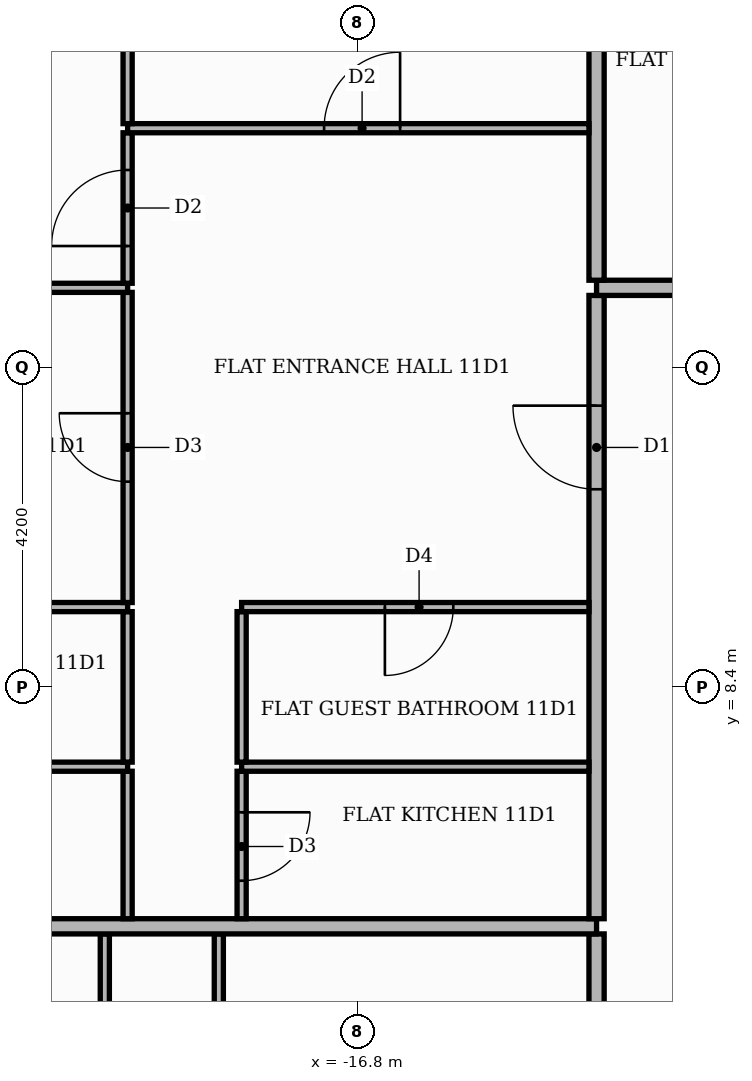
"""IFC4 building model, lengths in metres.
Left out: names, types, materials, properties, quantities, classifications, styles, units other than length and angle.
Written with IfcOpenShell. Run it as: python <this file> out.ifc"""

import sys

from ifc_helpers import new_model, si_unit, direction, frame, frame_2d, origin, place, context, subcontext, project, spatial, rectangle, extrude, element, fill, save


model = new_model("IFC4")
c1 = context("Model", 3, precision=1e-05, world=origin(), true_north=direction((0.0, 1.0)))
c2 = subcontext(c1, "Body", "Model", "MODEL_VIEW")
j1 = project(units=[si_unit("LENGTHUNIT", "METRE"), si_unit("PLANEANGLEUNIT", "RADIAN")], contexts=[c1])
p1 = place(None, origin())
s1 = spatial("IfcSite", under=j1, at=p1, CompositionType="ELEMENT")
p2 = place(p1, origin())
s2 = spatial("IfcBuilding", under=s1, at=p2, CompositionType="ELEMENT")
p3 = place(p2, frame((0.0, 0.0, 50.4)))
s3 = spatial("IfcBuildingStorey", under=s2, at=p3, CompositionType="ELEMENT", Elevation=50.4)
p4 = place(p3, frame((-13.65, -13.55, 0.0), z_axis=(0.0, 0.0, 1.0), x_axis=(0.0, 1.0, 0.0)))
e1 = element("IfcWall", 1, at=p4, inside=s3, PredefinedType="PARTITIONING", context=c2, shape_type="SweptSolid", body=[
    extrude(rectangle(XDim=18.7, YDim=0.2, at=frame_2d((9.35, 0.0))), origin(), (0.0, 0.0, 1.0), 3.48),
])
p5 = place(p4, frame((11.95, 0.0, 0.0)))
e2 = element("IfcOpeningElement", 2, at=p5, cuts=e1, PredefinedType="OPENING", context=c2, shape_type="SweptSolid", body=[
    extrude(rectangle(XDim=1.1, YDim=2.4, at=frame_2d((0.55, 1.2))), frame((0.0, 0.11, 0.0), z_axis=(0.0, -1.0, 0.0), x_axis=(1.0, 0.0, 0.0)), (0.0, 0.0, 1.0), 0.22),
])
p6 = place(p3, frame((-20.12, 1.11, 0.0), z_axis=(0.0, 0.0, 1.0), x_axis=(0.0, 1.0, 0.0)))
e3 = element("IfcWall", 3, at=p6, inside=s3, PredefinedType="PARTITIONING", context=c2, shape_type="SweptSolid", body=[
    extrude(rectangle(XDim=4.04, YDim=0.12, at=frame_2d((2.02, 0.0))), origin(), (0.0, 0.0, 1.0), 3.48),
])
p7 = place(p6, frame((1.54, 0.0, 0.0)))
e4 = element("IfcOpeningElement", 4, at=p7, cuts=e3, PredefinedType="OPENING", context=c2, shape_type="SweptSolid", body=[
    extrude(rectangle(XDim=1.0, YDim=2.1, at=frame_2d((0.5, 1.05))), frame((0.0, 0.07, 0.0), z_axis=(0.0, -1.0, 0.0), x_axis=(1.0, 0.0, 0.0)), (0.0, 0.0, 1.0), 0.14),
])
p8 = place(p3, frame((-18.62, 1.11, 0.0), z_axis=(0.0, 0.0, 1.0), x_axis=(0.0, 1.0, 0.0)))
e5 = element("IfcWall", 5, at=p8, inside=s3, PredefinedType="PARTITIONING", context=c2, shape_type="SweptSolid", body=[
    extrude(rectangle(XDim=4.04, YDim=0.12, at=frame_2d((2.02, 0.0))), origin(), (0.0, 0.0, 1.0), 3.48),
])
p9 = place(p3, frame((-25.42, 5.25, 0.0), z_axis=(0.0, 0.0, 1.0), x_axis=(1.0, 0.0, 0.0)))
e6 = element("IfcWall", 6, at=p9, inside=s3, PredefinedType="PARTITIONING", context=c2, shape_type="SweptSolid", body=[
    extrude(rectangle(XDim=11.77, YDim=0.2, at=frame_2d((5.885, 0.0))), origin(), (0.0, 0.0, 1.0), 3.48),
])
p10 = place(p3, frame((-19.82, 5.35, 0.0), z_axis=(0.0, 0.0, 1.0), x_axis=(0.0, 1.0, 0.0)))
e7 = element("IfcWall", 7, at=p10, inside=s3, PredefinedType="PARTITIONING", context=c2, shape_type="SweptSolid", body=[
    extrude(rectangle(XDim=1.94, YDim=0.12, at=frame_2d((0.97, 0.0))), origin(), (0.0, 0.0, 1.0), 3.48),
])
p11 = place(p3, frame((-18.32, 5.35, 0.0), z_axis=(0.0, 0.0, 1.0), x_axis=(0.0, 1.0, 0.0)))
e8 = element("IfcWall", 8, at=p11, inside=s3, PredefinedType="PARTITIONING", context=c2, shape_type="SweptSolid", body=[
    extrude(rectangle(XDim=1.94, YDim=0.12, at=frame_2d((0.97, 0.0))), origin(), (0.0, 0.0, 1.0), 3.48),
])
p12 = place(p11, frame((0.5, 0.0, 0.0)))
e9 = element("IfcOpeningElement", 9, at=p12, cuts=e8, PredefinedType="OPENING", context=c2, shape_type="SweptSolid", body=[
    extrude(rectangle(XDim=0.9, YDim=2.1, at=frame_2d((0.45, 1.05))), frame((0.0, 0.07, 0.0), z_axis=(0.0, -1.0, 0.0), x_axis=(1.0, 0.0, 0.0)), (0.0, 0.0, 1.0), 0.14),
])
p13 = place(p3, frame((-13.65, 5.35, 0.0), z_axis=(0.0, 0.0, 1.0), x_axis=(0.0, 1.0, 0.0)))
e10 = element("IfcWall", 10, at=p13, inside=s3, PredefinedType="PARTITIONING", context=c2, shape_type="SweptSolid", body=[
    extrude(rectangle(XDim=8.2, YDim=0.2, at=frame_2d((4.1, 0.0))), origin(), (0.0, 0.0, 1.0), 3.48),
])
p14 = place(p13, frame((5.65, 0.0, 0.0)))
e11 = element("IfcOpeningElement", 11, at=p14, cuts=e10, PredefinedType="OPENING", context=c2, shape_type="SweptSolid", body=[
    extrude(rectangle(XDim=1.1, YDim=2.4, at=frame_2d((0.55, 1.2))), frame((0.0, 0.11, 0.0), z_axis=(0.0, -1.0, 0.0), x_axis=(1.0, 0.0, 0.0)), (0.0, 0.0, 1.0), 0.22),
])
p15 = place(p3, frame((-25.42, 7.35, 0.0), z_axis=(0.0, 0.0, 1.0), x_axis=(1.0, 0.0, 0.0)))
e12 = element("IfcWall", 12, at=p15, inside=s3, PredefinedType="PARTITIONING", context=c2, shape_type="SweptSolid", body=[
    extrude(rectangle(XDim=5.6, YDim=0.12, at=frame_2d((2.8, 0.0))), origin(), (0.0, 0.0, 1.0), 3.48),
])
p16 = place(p15, frame((2.2, 0.0, 0.0)))
e13 = element("IfcOpeningElement", 13, at=p16, cuts=e12, PredefinedType="OPENING", context=c2, shape_type="SweptSolid", body=[
    extrude(rectangle(XDim=0.9, YDim=2.1, at=frame_2d((0.45, 1.05))), frame((0.0, 0.07, 0.0), z_axis=(0.0, -1.0, 0.0), x_axis=(1.0, 0.0, 0.0)), (0.0, 0.0, 1.0), 0.14),
])
p17 = place(p3, frame((-18.32, 7.35, 0.0), z_axis=(0.0, 0.0, 1.0), x_axis=(1.0, 0.0, 0.0)))
e14 = element("IfcWall", 14, at=p17, inside=s3, PredefinedType="PARTITIONING", context=c2, shape_type="SweptSolid", body=[
    extrude(rectangle(XDim=4.57, YDim=0.12, at=frame_2d((2.285, 0.0))), origin(), (0.0, 0.0, 1.0), 3.48),
])
for number, where, z_axis, x_axis in (
    (15, (-19.82, 7.41, 0.0), (0.0, 0.0, 1.0), (0.0, 1.0, 0.0)),
    (16, (-18.32, 7.41, 0.0), (0.0, 0.0, 1.0), (0.0, 1.0, 0.0)),
):
    element("IfcWall", number, at=place(p3, frame(where, z_axis=z_axis, x_axis=x_axis)), inside=s3, PredefinedType="PARTITIONING", context=c2, shape_type="SweptSolid", body=[
        extrude(rectangle(XDim=1.98, YDim=0.12, at=frame_2d((0.99, 0.0))), origin(), (0.0, 0.0, 1.0), 3.48),
    ])
p18 = place(p3, frame((-25.42, 9.45, 0.0), z_axis=(0.0, 0.0, 1.0), x_axis=(1.0, 0.0, 0.0)))
e17 = element("IfcWall", 17, at=p18, inside=s3, PredefinedType="PARTITIONING", context=c2, shape_type="SweptSolid", body=[
    extrude(rectangle(XDim=5.6, YDim=0.12, at=frame_2d((2.8, 0.0))), origin(), (0.0, 0.0, 1.0), 3.48),
])
p19 = place(p18, frame((2.2, 0.0, 0.0)))
e18 = element("IfcOpeningElement", 18, at=p19, cuts=e17, PredefinedType="OPENING", context=c2, shape_type="SweptSolid", body=[
    extrude(rectangle(XDim=0.9, YDim=2.1, at=frame_2d((0.45, 1.05))), frame((0.0, 0.07, 0.0), z_axis=(0.0, -1.0, 0.0), x_axis=(1.0, 0.0, 0.0)), (0.0, 0.0, 1.0), 0.14),
])
p20 = place(p3, frame((-18.32, 9.45, 0.0), z_axis=(0.0, 0.0, 1.0), x_axis=(1.0, 0.0, 0.0)))
e19 = element("IfcWall", 19, at=p20, inside=s3, PredefinedType="PARTITIONING", context=c2, shape_type="SweptSolid", body=[
    extrude(rectangle(XDim=4.57, YDim=0.12, at=frame_2d((2.285, 0.0))), origin(), (0.0, 0.0, 1.0), 3.48),
])
p21 = place(p20, frame((1.885, 0.0, 0.0)))
e20 = element("IfcOpeningElement", 20, at=p21, cuts=e19, PredefinedType="OPENING", context=c2, shape_type="SweptSolid", body=[
    extrude(rectangle(XDim=0.9, YDim=2.1, at=frame_2d((0.45, 1.05))), frame((0.0, 0.07, 0.0), z_axis=(0.0, -1.0, 0.0), x_axis=(1.0, 0.0, 0.0)), (0.0, 0.0, 1.0), 0.14),
])
p22 = place(p3, frame((-19.82, 9.51, 0.0), z_axis=(0.0, 0.0, 1.0), x_axis=(0.0, 1.0, 0.0)))
e21 = element("IfcWall", 21, at=p22, inside=s3, PredefinedType="PARTITIONING", context=c2, shape_type="SweptSolid", body=[
    extrude(rectangle(XDim=4.08, YDim=0.12, at=frame_2d((2.04, 0.0))), origin(), (0.0, 0.0, 1.0), 3.48),
])
p23 = place(p22, frame((1.59, 0.0, 0.0)))
e22 = element("IfcOpeningElement", 22, at=p23, cuts=e21, PredefinedType="OPENING", context=c2, shape_type="SweptSolid", body=[
    extrude(rectangle(XDim=0.9, YDim=2.1, at=frame_2d((0.45, 1.05))), frame((0.0, 0.07, 0.0), z_axis=(0.0, -1.0, 0.0), x_axis=(1.0, 0.0, 0.0)), (0.0, 0.0, 1.0), 0.14),
])
p24 = place(p3, frame((-25.42, 13.65, 0.0), z_axis=(0.0, 0.0, 1.0), x_axis=(1.0, 0.0, 0.0)))
e23 = element("IfcWall", 23, at=p24, inside=s3, PredefinedType="PARTITIONING", context=c2, shape_type="SweptSolid", body=[
    extrude(rectangle(XDim=5.6, YDim=0.12, at=frame_2d((2.8, 0.0))), origin(), (0.0, 0.0, 1.0), 3.48),
])
p25 = place(p3, frame((-13.65, 13.65, 0.0), z_axis=(0.0, 0.0, 1.0), x_axis=(1.0, 0.0, 0.0)))
e24 = element("IfcWall", 24, at=p25, inside=s3, PredefinedType="PARTITIONING", context=c2, shape_type="SweptSolid", body=[
    extrude(rectangle(XDim=39.07, YDim=0.2, at=frame_2d((19.535, 0.0))), origin(), (0.0, 0.0, 1.0), 3.48),
])
p26 = place(p25, frame((24.65, 0.0, 0.0)))
e25 = element("IfcOpeningElement", 25, at=p26, cuts=e24, PredefinedType="OPENING", context=c2, shape_type="SweptSolid", body=[
    extrude(rectangle(XDim=1.1, YDim=2.4, at=frame_2d((0.55, 1.2))), frame((0.0, 0.11, 0.0), z_axis=(0.0, -1.0, 0.0), x_axis=(1.0, 0.0, 0.0)), (0.0, 0.0, 1.0), 0.22),
])
p27 = place(p25, frame((14.15, 0.0, 0.0)))
e26 = element("IfcOpeningElement", 26, at=p27, cuts=e24, PredefinedType="OPENING", context=c2, shape_type="SweptSolid", body=[
    extrude(rectangle(XDim=1.1, YDim=2.4, at=frame_2d((0.55, 1.2))), frame((0.0, 0.11, 0.0), z_axis=(0.0, -1.0, 0.0), x_axis=(1.0, 0.0, 0.0)), (0.0, 0.0, 1.0), 0.22),
])
p28 = place(p3, frame((-19.82, 13.71, 0.0), z_axis=(0.0, 0.0, 1.0), x_axis=(0.0, 1.0, 0.0)))
e27 = element("IfcWall", 27, at=p28, inside=s3, PredefinedType="PARTITIONING", context=c2, shape_type="SweptSolid", body=[
    extrude(rectangle(XDim=1.98, YDim=0.12, at=frame_2d((0.99, 0.0))), origin(), (0.0, 0.0, 1.0), 3.48),
])
p29 = place(p28, frame((0.49, 0.0, 0.0)))
e28 = element("IfcOpeningElement", 28, at=p29, cuts=e27, PredefinedType="OPENING", context=c2, shape_type="SweptSolid", body=[
    extrude(rectangle(XDim=1.0, YDim=2.1, at=frame_2d((0.5, 1.05))), frame((0.0, 0.07, 0.0), z_axis=(0.0, -1.0, 0.0), x_axis=(1.0, 0.0, 0.0)), (0.0, 0.0, 1.0), 0.14),
])
p30 = place(p3, frame((-13.65, 13.75, 0.0), z_axis=(0.0, 0.0, 1.0), x_axis=(0.0, 1.0, 0.0)))
e29 = element("IfcWall", 29, at=p30, inside=s3, PredefinedType="PARTITIONING", context=c2, shape_type="SweptSolid", body=[
    extrude(rectangle(XDim=11.67, YDim=0.2, at=frame_2d((5.835, 0.0))), origin(), (0.0, 0.0, 1.0), 3.48),
])
p31 = place(p3, frame((-19.82, 15.75, 0.0), z_axis=(0.0, 0.0, 1.0), x_axis=(1.0, 0.0, 0.0)))
e30 = element("IfcWall", 30, at=p31, inside=s3, PredefinedType="PARTITIONING", context=c2, shape_type="SweptSolid", body=[
    extrude(rectangle(XDim=6.07, YDim=0.12, at=frame_2d((3.035, 0.0))), origin(), (0.0, 0.0, 1.0), 3.48),
])
p32 = place(p31, frame((2.585, 0.0, 0.0)))
e31 = element("IfcOpeningElement", 31, at=p32, cuts=e30, PredefinedType="OPENING", context=c2, shape_type="SweptSolid", body=[
    extrude(rectangle(XDim=1.0, YDim=2.1, at=frame_2d((0.5, 1.05))), frame((0.0, 0.07, 0.0), z_axis=(0.0, -1.0, 0.0), x_axis=(1.0, 0.0, 0.0)), (0.0, 0.0, 1.0), 0.14),
])
p33 = place(p3, frame((-19.82, 15.81, 0.0), z_axis=(0.0, 0.0, 1.0), x_axis=(0.0, 1.0, 0.0)))
e32 = element("IfcWall", 32, at=p33, inside=s3, PredefinedType="PARTITIONING", context=c2, shape_type="SweptSolid", body=[
    extrude(rectangle(XDim=1.49, YDim=0.12, at=frame_2d((0.745, 0.0))), origin(), (0.0, 0.0, 1.0), 3.48),
])
p34 = place(p14, origin())
e33 = element("IfcDoor", 33, at=p34, inside=s3, OperationType="SINGLE_SWING_RIGHT", PredefinedType="DOOR", context=c2, shape_type="SweptSolid", body=[
    extrude(rectangle(XDim=1.1, YDim=2.4, at=frame_2d((0.55, 1.2))), frame((0.0, 0.025, 0.0), z_axis=(0.0, -1.0, 0.0), x_axis=(1.0, 0.0, 0.0)), (0.0, 0.0, 1.0), 0.05),
])
fill(e11, e33)
p35 = place(p32, origin())
e34 = element("IfcDoor", 34, at=p35, inside=s3, OperationType="SINGLE_SWING_RIGHT", PredefinedType="DOOR", context=c2, shape_type="SweptSolid", body=[
    extrude(rectangle(XDim=1.0, YDim=2.1, at=frame_2d((0.5, 1.05))), frame((0.0, 0.025, 0.0), z_axis=(0.0, -1.0, 0.0), x_axis=(1.0, 0.0, 0.0)), (0.0, 0.0, 1.0), 0.05),
])
fill(e31, e34)
p36 = place(p21, frame((0.9, 0.0, 0.0), z_axis=(0.0, 0.0, 1.0), x_axis=(-1.0, 0.0, 0.0)))
e35 = element("IfcDoor", 35, at=p36, inside=s3, OperationType="SINGLE_SWING_LEFT", PredefinedType="DOOR", context=c2, shape_type="SweptSolid", body=[
    extrude(rectangle(XDim=0.9, YDim=2.1, at=frame_2d((0.45, 1.05))), frame((0.0, 0.025, 0.0), z_axis=(0.0, -1.0, 0.0), x_axis=(1.0, 0.0, 0.0)), (0.0, 0.0, 1.0), 0.05),
])
fill(e20, e35)
p37 = place(p12, frame((0.9, 0.0, 0.0), z_axis=(0.0, 0.0, 1.0), x_axis=(-1.0, 0.0, 0.0)))
e36 = element("IfcDoor", 36, at=p37, inside=s3, OperationType="SINGLE_SWING_RIGHT", PredefinedType="DOOR", context=c2, shape_type="SweptSolid", body=[
    extrude(rectangle(XDim=0.9, YDim=2.1, at=frame_2d((0.45, 1.05))), frame((0.0, 0.025, 0.0), z_axis=(0.0, -1.0, 0.0), x_axis=(1.0, 0.0, 0.0)), (0.0, 0.0, 1.0), 0.05),
])
fill(e9, e36)
p38 = place(p29, origin())
e37 = element("IfcDoor", 37, at=p38, inside=s3, OperationType="SINGLE_SWING_LEFT", PredefinedType="DOOR", context=c2, shape_type="SweptSolid", body=[
    extrude(rectangle(XDim=1.0, YDim=2.1, at=frame_2d((0.5, 1.05))), frame((0.0, 0.025, 0.0), z_axis=(0.0, -1.0, 0.0), x_axis=(1.0, 0.0, 0.0)), (0.0, 0.0, 1.0), 0.05),
])
fill(e28, e37)
p39 = place(p23, origin())
e38 = element("IfcDoor", 38, at=p39, inside=s3, OperationType="SINGLE_SWING_RIGHT", PredefinedType="DOOR", context=c2, shape_type="SweptSolid", body=[
    extrude(rectangle(XDim=0.9, YDim=2.1, at=frame_2d((0.45, 1.05))), frame((0.0, 0.025, 0.0), z_axis=(0.0, -1.0, 0.0), x_axis=(1.0, 0.0, 0.0)), (0.0, 0.0, 1.0), 0.05),
])
fill(e22, e38)
save(model, sys.argv[1])
